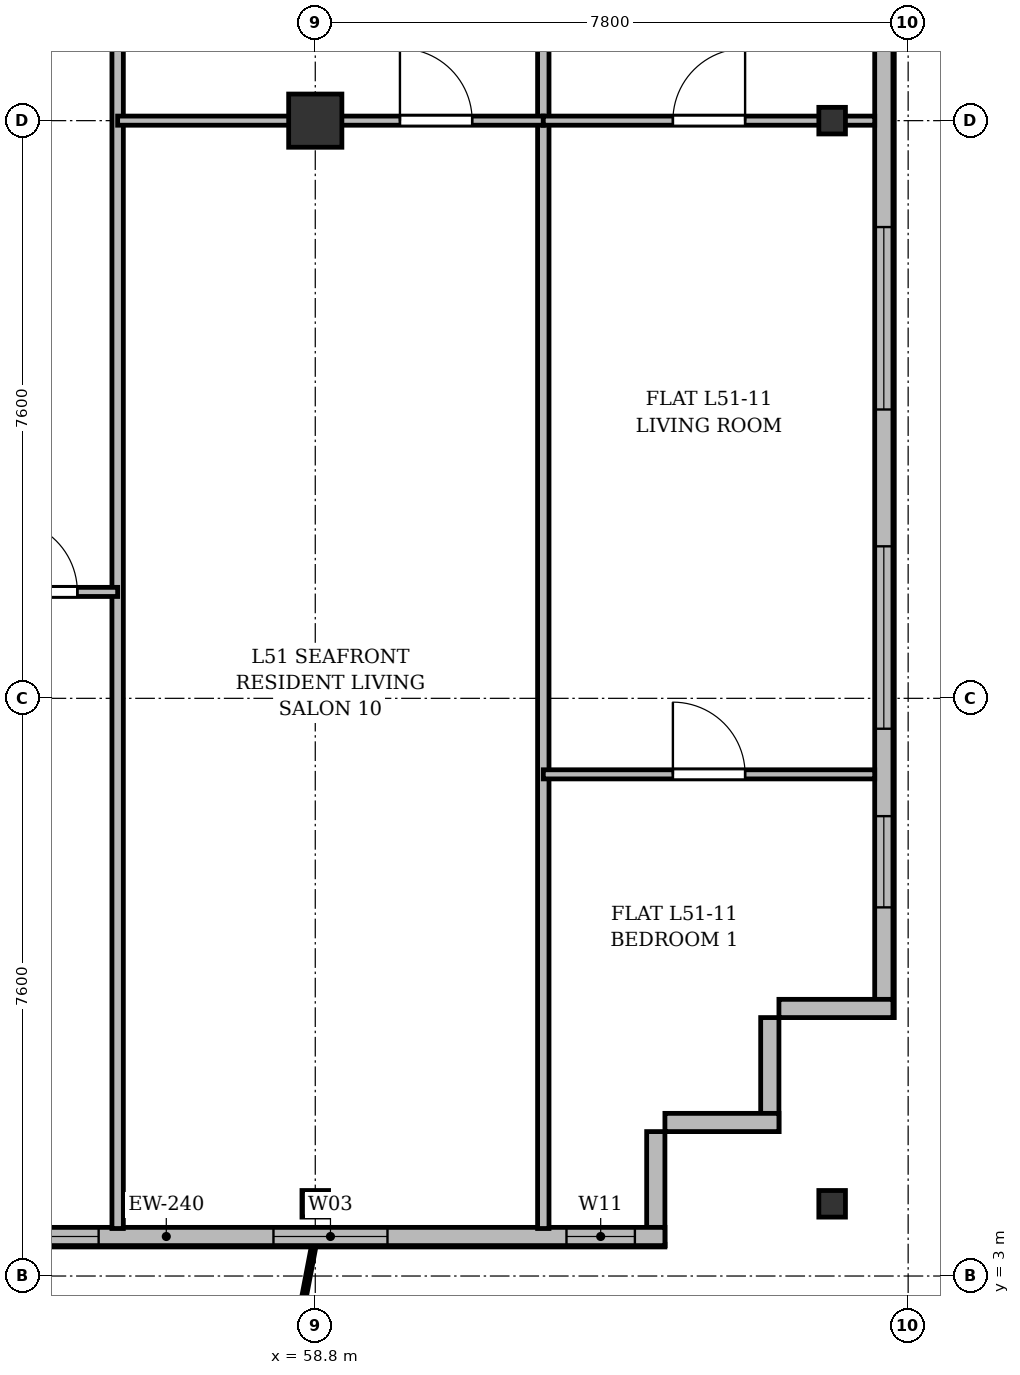
"""IFC4 building model, lengths in metres.
Left out: names, types, materials, properties, quantities, classifications, styles, units other than length and angle.
Written with IfcOpenShell. Run it as: python <this file> out.ifc"""

import sys

from ifc_helpers import new_model, si_unit, direction, frame, frame_2d, origin, origin_2d, place, context, subcontext, project, spatial, rectangle, i_section, extrude, source, transform, mapped, element, fill, save


model = new_model("IFC4")
c1 = context("Model", 3, precision=1e-05, world=origin(), true_north=direction((0.0, 1.0)))
c2 = subcontext(c1, "Body", "Model", "MODEL_VIEW")
j1 = project(units=[si_unit("LENGTHUNIT", "METRE"), si_unit("PLANEANGLEUNIT", "RADIAN")], contexts=[c1])
p1 = place(None, origin())
s1 = spatial("IfcSite", under=j1, at=p1, CompositionType="ELEMENT")
p2 = place(p1, origin())
s2 = spatial("IfcBuilding", under=s1, at=p2, CompositionType="ELEMENT")
p3 = place(p2, frame((0.0, 0.0, 197.7)))
s3 = spatial("IfcBuildingStorey", under=s2, at=p3, CompositionType="ELEMENT", Elevation=197.7)
m1 = source(origin(), c2, "Body", "SweptSolid", [
    extrude(i_section(OverallWidth=0.35, OverallDepth=0.35, WebThickness=0.018, FlangeThickness=0.028, at=origin_2d()), origin(), (0.0, 0.0, 1.0), 3.6),
])
p4 = place(p3, frame((58.8, 3.95, 0.0), z_axis=(0.0, 0.0, 1.0), x_axis=(1.0, 0.0, 0.0)))
e1 = element("IfcColumn", 1, at=p4, inside=s3, PredefinedType="COLUMN", context=c2, shape_type="MappedRepresentation", body=[
    mapped(m1, transform((0.0, 0.0, 0.0), x_axis=(1.0, 0.0, 0.0), y_axis=(0.0, 1.0, 0.0), z_axis=(0.0, 0.0, 1.0), scale=1.0)),
])
m2 = source(origin(), c2, "Body", "SweptSolid", [
    extrude(rectangle(XDim=0.7, YDim=0.7, at=origin_2d()), origin(), (0.0, 0.0, 1.0), 3.6),
])
p5 = place(p3, frame((58.8, 18.2, 0.0), z_axis=(0.0, 0.0, 1.0), x_axis=(1.0, 0.0, 0.0)))
e2 = element("IfcColumn", 2, at=p5, inside=s3, PredefinedType="COLUMN", context=c2, shape_type="MappedRepresentation", body=[
    mapped(m2, transform((0.0, 0.0, 0.0), x_axis=(1.0, 0.0, 0.0), y_axis=(0.0, 1.0, 0.0), z_axis=(0.0, 0.0, 1.0), scale=1.0)),
])
for number, where, z_axis, x_axis in (
    (3, (65.6, 3.95, 0.0), (0.0, 0.0, 1.0), (1.0, 0.0, 0.0)),
    (4, (65.6, 18.2, 0.0), (0.0, 0.0, 1.0), (1.0, 0.0, 0.0)),
):
    element("IfcColumn", number, at=place(p3, frame(where, z_axis=z_axis, x_axis=x_axis)), inside=s3, PredefinedType="COLUMN", context=c2, shape_type="MappedRepresentation", body=[
        mapped(m1, transform((0.0, 0.0, 0.0), x_axis=(1.0, 0.0, 0.0), y_axis=(0.0, 1.0, 0.0), z_axis=(0.0, 0.0, 1.0), scale=1.0)),
    ])
p6 = place(p3, frame((66.28, 45.5, 0.0), z_axis=(0.0, 0.0, 1.0), x_axis=(0.0, -1.0, 0.0)))
e5 = element("IfcWall", 5, at=p6, inside=s3, PredefinedType="SOLIDWALL", context=c2, shape_type="SweptSolid", body=[
    extrude(rectangle(XDim=39.1, YDim=0.24, at=frame_2d((19.55, 0.0))), origin(), (0.0, 0.0, 1.0), 3.36),
])
p7 = place(p6, frame((36.45, 0.0, 0.92)))
e6 = element("IfcOpeningElement", 6, at=p7, cuts=e5, PredefinedType="OPENING", context=c2, shape_type="SweptSolid", body=[
    extrude(rectangle(XDim=1.2, YDim=1.65, at=frame_2d((0.6, 0.825))), frame((0.0, 0.13, 0.0), z_axis=(0.0, -1.0, 0.0), x_axis=(1.0, 0.0, 0.0)), (0.0, 0.0, 1.0), 0.26),
])
p8 = place(p6, frame((32.9, 0.0, 0.92)))
e7 = element("IfcOpeningElement", 7, at=p8, cuts=e5, PredefinedType="OPENING", context=c2, shape_type="SweptSolid", body=[
    extrude(rectangle(XDim=2.4, YDim=2.1, at=frame_2d((1.2, 1.05))), frame((0.0, 0.13, 0.0), z_axis=(0.0, -1.0, 0.0), x_axis=(1.0, 0.0, 0.0)), (0.0, 0.0, 1.0), 0.26),
])
p9 = place(p6, frame((28.7, 0.0, 0.92)))
e8 = element("IfcOpeningElement", 8, at=p9, cuts=e5, PredefinedType="OPENING", context=c2, shape_type="SweptSolid", body=[
    extrude(rectangle(XDim=2.4, YDim=2.1, at=frame_2d((1.2, 1.05))), frame((0.0, 0.13, 0.0), z_axis=(0.0, -1.0, 0.0), x_axis=(1.0, 0.0, 0.0)), (0.0, 0.0, 1.0), 0.26),
])
p10 = place(p6, frame((21.5, 0.0, 0.92)))
e9 = element("IfcOpeningElement", 9, at=p10, cuts=e5, PredefinedType="OPENING", context=c2, shape_type="SweptSolid", body=[
    extrude(rectangle(XDim=2.4, YDim=2.1, at=frame_2d((1.2, 1.05))), frame((0.0, 0.13, 0.0), z_axis=(0.0, -1.0, 0.0), x_axis=(1.0, 0.0, 0.0)), (0.0, 0.0, 1.0), 0.26),
])
p11 = place(p6, frame((7.5, 0.0, 0.92)))
e10 = element("IfcOpeningElement", 10, at=p11, cuts=e5, PredefinedType="OPENING", context=c2, shape_type="SweptSolid", body=[
    extrude(rectangle(XDim=2.4, YDim=2.1, at=frame_2d((1.2, 1.05))), frame((0.0, 0.13, 0.0), z_axis=(0.0, -1.0, 0.0), x_axis=(1.0, 0.0, 0.0)), (0.0, 0.0, 1.0), 0.26),
])
p12 = place(p6, frame((4.5, 0.0, 0.92)))
e11 = element("IfcOpeningElement", 11, at=p12, cuts=e5, PredefinedType="OPENING", context=c2, shape_type="SweptSolid", body=[
    extrude(rectangle(XDim=1.2, YDim=1.65, at=frame_2d((0.6, 0.825))), frame((0.0, 0.13, 0.0), z_axis=(0.0, -1.0, 0.0), x_axis=(1.0, 0.0, 0.0)), (0.0, 0.0, 1.0), 0.26),
])
p13 = place(p6, frame((1.15, 0.0, 0.92)))
e12 = element("IfcOpeningElement", 12, at=p13, cuts=e5, PredefinedType="OPENING", context=c2, shape_type="SweptSolid", body=[
    extrude(rectangle(XDim=1.2, YDim=1.65, at=frame_2d((0.6, 0.825))), frame((0.0, 0.13, 0.0), z_axis=(0.0, -1.0, 0.0), x_axis=(1.0, 0.0, 0.0)), (0.0, 0.0, 1.0), 0.26),
])
p14 = place(p3, frame((66.4, 6.52, 0.0), z_axis=(0.0, 0.0, 1.0), x_axis=(-1.0, 0.0, 0.0)))
e13 = element("IfcWall", 13, at=p14, inside=s3, PredefinedType="SOLIDWALL", context=c2, shape_type="SweptSolid", body=[
    extrude(rectangle(XDim=1.5, YDim=0.24, at=frame_2d((0.75, 0.0))), origin(), (0.0, 0.0, 1.0), 2.86),
])
for number, where, z_axis, x_axis in (
    (14, (64.78, 6.4, 0.0), (0.0, 0.0, 1.0), (0.0, -1.0, 0.0)),
    (15, (64.9, 5.02, 0.0), (0.0, 0.0, 1.0), (-1.0, 0.0, 0.0)),
):
    element("IfcWall", number, at=place(p3, frame(where, z_axis=z_axis, x_axis=x_axis)), inside=s3, PredefinedType="SOLIDWALL", context=c2, shape_type="SweptSolid", body=[
        extrude(rectangle(XDim=1.5, YDim=0.24, at=frame_2d((0.75, 0.0))), origin(), (0.0, 0.0, 1.0), 3.36),
    ])
p15 = place(p3, frame((63.28, 4.9, 0.0), z_axis=(0.0, 0.0, 1.0), x_axis=(0.0, -1.0, 0.0)))
e16 = element("IfcWall", 16, at=p15, inside=s3, PredefinedType="SOLIDWALL", context=c2, shape_type="SweptSolid", body=[
    extrude(rectangle(XDim=1.5, YDim=0.24, at=frame_2d((0.75, 0.0))), origin(), (0.0, 0.0, 1.0), 2.91),
])
p16 = place(p3, frame((63.4, 3.52, 0.0), z_axis=(0.0, 0.0, 1.0), x_axis=(-1.0, 0.0, 0.0)))
e17 = element("IfcWall", 17, at=p16, inside=s3, PredefinedType="SOLIDWALL", context=c2, shape_type="SweptSolid", body=[
    extrude(rectangle(XDim=19.6, YDim=0.24, at=frame_2d((9.8, 0.0))), origin(), (0.0, 0.0, 1.0), 3.36),
])
p17 = place(p16, frame((0.395, 0.0, 0.9)))
e18 = element("IfcOpeningElement", 18, at=p17, cuts=e17, PredefinedType="OPENING", context=c2, shape_type="SweptSolid", body=[
    extrude(rectangle(XDim=0.9, YDim=1.65, at=frame_2d((0.45, 0.825))), frame((0.0, 0.13, 0.0), z_axis=(0.0, -1.0, 0.0), x_axis=(1.0, 0.0, 0.0)), (0.0, 0.0, 1.0), 0.26),
])
p18 = place(p16, frame((3.65, 0.0, 0.9)))
e19 = element("IfcOpeningElement", 19, at=p18, cuts=e17, PredefinedType="OPENING", context=c2, shape_type="SweptSolid", body=[
    extrude(rectangle(XDim=1.5, YDim=1.75, at=frame_2d((0.75, 0.875))), frame((0.0, 0.13, 0.0), z_axis=(0.0, -1.0, 0.0), x_axis=(1.0, 0.0, 0.0)), (0.0, 0.0, 1.0), 0.26),
])
p19 = place(p16, frame((7.45, 0.0, 0.9)))
e20 = element("IfcOpeningElement", 20, at=p19, cuts=e17, PredefinedType="OPENING", context=c2, shape_type="SweptSolid", body=[
    extrude(rectangle(XDim=1.5, YDim=1.75, at=frame_2d((0.75, 0.875))), frame((0.0, 0.13, 0.0), z_axis=(0.0, -1.0, 0.0), x_axis=(1.0, 0.0, 0.0)), (0.0, 0.0, 1.0), 0.26),
])
p20 = place(p16, frame((9.775, 0.0, 0.9)))
e21 = element("IfcOpeningElement", 21, at=p20, cuts=e17, PredefinedType="OPENING", context=c2, shape_type="SweptSolid", body=[
    extrude(rectangle(XDim=1.65, YDim=1.85, at=frame_2d((0.825, 0.925))), frame((0.0, 0.13, 0.0), z_axis=(0.0, -1.0, 0.0), x_axis=(1.0, 0.0, 0.0)), (0.0, 0.0, 1.0), 0.26),
])
p21 = place(p16, frame((13.42, 0.0, 0.0)))
e22 = element("IfcOpeningElement", 22, at=p21, cuts=e17, PredefinedType="OPENING", context=c2, shape_type="SweptSolid", body=[
    extrude(rectangle(XDim=1.2, YDim=2.2, at=frame_2d((0.6, 1.1))), frame((0.0, 0.13, 0.0), z_axis=(0.0, -1.0, 0.0), x_axis=(1.0, 0.0, 0.0)), (0.0, 0.0, 1.0), 0.26),
])
p22 = place(p16, frame((16.055, 0.0, 0.9)))
e23 = element("IfcOpeningElement", 23, at=p22, cuts=e17, PredefinedType="OPENING", context=c2, shape_type="SweptSolid", body=[
    extrude(rectangle(XDim=2.2, YDim=1.8, at=frame_2d((1.1, 0.9))), frame((0.0, 0.13, 0.0), z_axis=(0.0, -1.0, 0.0), x_axis=(1.0, 0.0, 0.0)), (0.0, 0.0, 1.0), 0.26),
])
for number, where, z_axis, x_axis in (
    (24, (61.8, 3.625, 0.0), (0.0, 0.0, 1.0), (0.0, 1.0, 0.0)),
    (25, (56.2, 3.625, 0.0), (0.0, 0.0, 1.0), (0.0, 1.0, 0.0)),
):
    element("IfcWall", number, at=place(p3, frame(where, z_axis=z_axis, x_axis=x_axis)), inside=s3, PredefinedType="PARTITIONING", context=c2, shape_type="SweptSolid", body=[
        extrude(rectangle(XDim=27.175, YDim=0.15, at=frame_2d((13.587, 0.0))), origin(), (0.0, 0.0, 1.0), 2.91),
    ])
p23 = place(p3, frame((54.2, 12.0, 0.0), z_axis=(0.0, 0.0, 1.0), x_axis=(1.0, 0.0, 0.0)))
e26 = element("IfcWall", 26, at=p23, inside=s3, PredefinedType="PARTITIONING", context=c2, shape_type="SweptSolid", body=[
    extrude(rectangle(XDim=2.0, YDim=0.12, at=frame_2d((1.0, 0.0))), origin(), (0.0, 0.0, 1.0), 3.36),
])
p24 = place(p23, frame((0.52, 0.0, 0.0)))
e27 = element("IfcOpeningElement", 27, at=p24, cuts=e26, PredefinedType="OPENING", context=c2, shape_type="SweptSolid", body=[
    extrude(rectangle(XDim=0.95, YDim=2.15, at=frame_2d((0.475, 1.075))), frame((0.0, 0.07, 0.0), z_axis=(0.0, -1.0, 0.0), x_axis=(1.0, 0.0, 0.0)), (0.0, 0.0, 1.0), 0.14),
])
p25 = place(p3, frame((56.2, 18.2, 0.0), z_axis=(0.0, 0.0, 1.0), x_axis=(1.0, 0.0, 0.0)))
e28 = element("IfcWall", 28, at=p25, inside=s3, PredefinedType="PARTITIONING", context=c2, shape_type="SweptSolid", body=[
    extrude(rectangle(XDim=5.6, YDim=0.12, at=frame_2d((2.8, 0.0))), origin(), (0.0, 0.0, 1.0), 2.91),
])
p26 = place(p25, frame((3.714, 0.0, 0.0)))
e29 = element("IfcOpeningElement", 29, at=p26, cuts=e28, PredefinedType="OPENING", context=c2, shape_type="SweptSolid", body=[
    extrude(rectangle(XDim=0.95, YDim=2.15, at=frame_2d((0.475, 1.075))), frame((0.0, 0.07, 0.0), z_axis=(0.0, -1.0, 0.0), x_axis=(1.0, 0.0, 0.0)), (0.0, 0.0, 1.0), 0.14),
])
p27 = place(p3, frame((61.8, 18.2, 0.0), z_axis=(0.0, 0.0, 1.0), x_axis=(1.0, 0.0, 0.0)))
e30 = element("IfcWall", 30, at=p27, inside=s3, PredefinedType="PARTITIONING", context=c2, shape_type="SweptSolid", body=[
    extrude(rectangle(XDim=4.36, YDim=0.12, at=frame_2d((2.18, 0.0))), origin(), (0.0, 0.0, 1.0), 2.91),
])
p28 = place(p27, frame((1.705, 0.0, 0.0)))
e31 = element("IfcOpeningElement", 31, at=p28, cuts=e30, PredefinedType="OPENING", context=c2, shape_type="SweptSolid", body=[
    extrude(rectangle(XDim=0.95, YDim=2.15, at=frame_2d((0.475, 1.075))), frame((0.0, 0.07, 0.0), z_axis=(0.0, -1.0, 0.0), x_axis=(1.0, 0.0, 0.0)), (0.0, 0.0, 1.0), 0.14),
])
p29 = place(p3, frame((61.8, 9.6, 0.0), z_axis=(0.0, 0.0, 1.0), x_axis=(1.0, 0.0, 0.0)))
e32 = element("IfcWall", 32, at=p29, inside=s3, PredefinedType="PARTITIONING", context=c2, shape_type="SweptSolid", body=[
    extrude(rectangle(XDim=4.36, YDim=0.12, at=frame_2d((2.18, 0.0))), origin(), (0.0, 0.0, 1.0), 2.86),
])
p30 = place(p29, frame((1.705, 0.0, 0.0)))
e33 = element("IfcOpeningElement", 33, at=p30, cuts=e32, PredefinedType="OPENING", context=c2, shape_type="SweptSolid", body=[
    extrude(rectangle(XDim=0.95, YDim=2.15, at=frame_2d((0.475, 1.075))), frame((0.0, 0.07, 0.0), z_axis=(0.0, -1.0, 0.0), x_axis=(1.0, 0.0, 0.0)), (0.0, 0.0, 1.0), 0.14),
])
m3 = source(origin(), c2, "Body", "SweptSolid", [
    extrude(rectangle(XDim=1.2, YDim=1.65, at=frame_2d((0.6, 0.825))), frame((0.0, 0.03, 0.0), z_axis=(0.0, -1.0, 0.0), x_axis=(1.0, 0.0, 0.0)), (0.0, 0.0, 1.0), 0.06),
])
p31 = place(p7, origin())
e34 = element("IfcWindow", 34, at=p31, inside=s3, PartitioningType="SINGLE_PANEL", PredefinedType="WINDOW", context=c2, shape_type="MappedRepresentation", body=[
    mapped(m3, transform((0.0, 0.0, 0.0), x_axis=(1.0, 0.0, 0.0), y_axis=(0.0, 1.0, 0.0), z_axis=(0.0, 0.0, 1.0), scale=1.0)),
])
fill(e6, e34)
m4 = source(origin(), c2, "Body", "SweptSolid", [
    extrude(rectangle(XDim=2.4, YDim=2.1, at=frame_2d((1.2, 1.05))), frame((0.0, 0.03, 0.0), z_axis=(0.0, -1.0, 0.0), x_axis=(1.0, 0.0, 0.0)), (0.0, 0.0, 1.0), 0.06),
])
p32 = place(p8, origin())
e35 = element("IfcWindow", 35, at=p32, inside=s3, PartitioningType="SINGLE_PANEL", PredefinedType="WINDOW", context=c2, shape_type="MappedRepresentation", body=[
    mapped(m4, transform((0.0, 0.0, 0.0), x_axis=(1.0, 0.0, 0.0), y_axis=(0.0, 1.0, 0.0), z_axis=(0.0, 0.0, 1.0), scale=1.0)),
])
fill(e7, e35)
p33 = place(p9, origin())
e36 = element("IfcWindow", 36, at=p33, inside=s3, PartitioningType="SINGLE_PANEL", PredefinedType="WINDOW", context=c2, shape_type="MappedRepresentation", body=[
    mapped(m4, transform((0.0, 0.0, 0.0), x_axis=(1.0, 0.0, 0.0), y_axis=(0.0, 1.0, 0.0), z_axis=(0.0, 0.0, 1.0), scale=1.0)),
])
fill(e8, e36)
m5 = source(origin(), c2, "Body", "SweptSolid", [
    extrude(rectangle(XDim=0.9, YDim=1.65, at=frame_2d((0.45, 0.825))), frame((0.0, 0.03, 0.0), z_axis=(0.0, -1.0, 0.0), x_axis=(1.0, 0.0, 0.0)), (0.0, 0.0, 1.0), 0.06),
])
p34 = place(p17, origin())
e37 = element("IfcWindow", 37, at=p34, inside=s3, PartitioningType="SINGLE_PANEL", PredefinedType="WINDOW", context=c2, shape_type="MappedRepresentation", body=[
    mapped(m5, transform((0.0, 0.0, 0.0), x_axis=(1.0, 0.0, 0.0), y_axis=(0.0, 1.0, 0.0), z_axis=(0.0, 0.0, 1.0), scale=1.0)),
])
fill(e18, e37)
m6 = source(origin(), c2, "Body", "SweptSolid", [
    extrude(rectangle(XDim=1.5, YDim=1.75, at=frame_2d((0.75, 0.875))), frame((0.0, 0.03, 0.0), z_axis=(0.0, -1.0, 0.0), x_axis=(1.0, 0.0, 0.0)), (0.0, 0.0, 1.0), 0.06),
])
p35 = place(p18, origin())
e38 = element("IfcWindow", 38, at=p35, inside=s3, PartitioningType="SINGLE_PANEL", PredefinedType="WINDOW", context=c2, shape_type="MappedRepresentation", body=[
    mapped(m6, transform((0.0, 0.0, 0.0), x_axis=(1.0, 0.0, 0.0), y_axis=(0.0, 1.0, 0.0), z_axis=(0.0, 0.0, 1.0), scale=1.0)),
])
fill(e19, e38)
p36 = place(p19, origin())
e39 = element("IfcWindow", 39, at=p36, inside=s3, PartitioningType="SINGLE_PANEL", PredefinedType="WINDOW", context=c2, shape_type="MappedRepresentation", body=[
    mapped(m6, transform((0.0, 0.0, 0.0), x_axis=(1.0, 0.0, 0.0), y_axis=(0.0, 1.0, 0.0), z_axis=(0.0, 0.0, 1.0), scale=1.0)),
])
fill(e20, e39)
m7 = source(origin(), c2, "Body", "SweptSolid", [
    extrude(rectangle(XDim=0.95, YDim=2.15, at=frame_2d((0.475, 1.075))), frame((0.0, 0.025, 0.0), z_axis=(0.0, -1.0, 0.0), x_axis=(1.0, 0.0, 0.0)), (0.0, 0.0, 1.0), 0.05),
])
p37 = place(p24, origin())
e40 = element("IfcDoor", 40, at=p37, inside=s3, OperationType="SINGLE_SWING_LEFT", PredefinedType="DOOR", context=c2, shape_type="MappedRepresentation", body=[
    mapped(m7, transform((0.0, 0.0, 0.0), x_axis=(1.0, 0.0, 0.0), y_axis=(0.0, 1.0, 0.0), z_axis=(0.0, 0.0, 1.0), scale=1.0)),
])
fill(e27, e40)
p38 = place(p26, origin())
e41 = element("IfcDoor", 41, at=p38, inside=s3, OperationType="SINGLE_SWING_LEFT", PredefinedType="DOOR", context=c2, shape_type="MappedRepresentation", body=[
    mapped(m7, transform((0.0, 0.0, 0.0), x_axis=(1.0, 0.0, 0.0), y_axis=(0.0, 1.0, 0.0), z_axis=(0.0, 0.0, 1.0), scale=1.0)),
])
fill(e29, e41)
p39 = place(p28, origin())
e42 = element("IfcDoor", 42, at=p39, inside=s3, OperationType="SINGLE_SWING_RIGHT", PredefinedType="DOOR", context=c2, shape_type="MappedRepresentation", body=[
    mapped(m7, transform((0.0, 0.0, 0.0), x_axis=(1.0, 0.0, 0.0), y_axis=(0.0, 1.0, 0.0), z_axis=(0.0, 0.0, 1.0), scale=1.0)),
])
fill(e31, e42)
p40 = place(p30, origin())
e43 = element("IfcDoor", 43, at=p40, inside=s3, OperationType="SINGLE_SWING_LEFT", PredefinedType="DOOR", context=c2, shape_type="MappedRepresentation", body=[
    mapped(m7, transform((0.0, 0.0, 0.0), x_axis=(1.0, 0.0, 0.0), y_axis=(0.0, 1.0, 0.0), z_axis=(0.0, 0.0, 1.0), scale=1.0)),
])
fill(e33, e43)
save(model, sys.argv[1])
